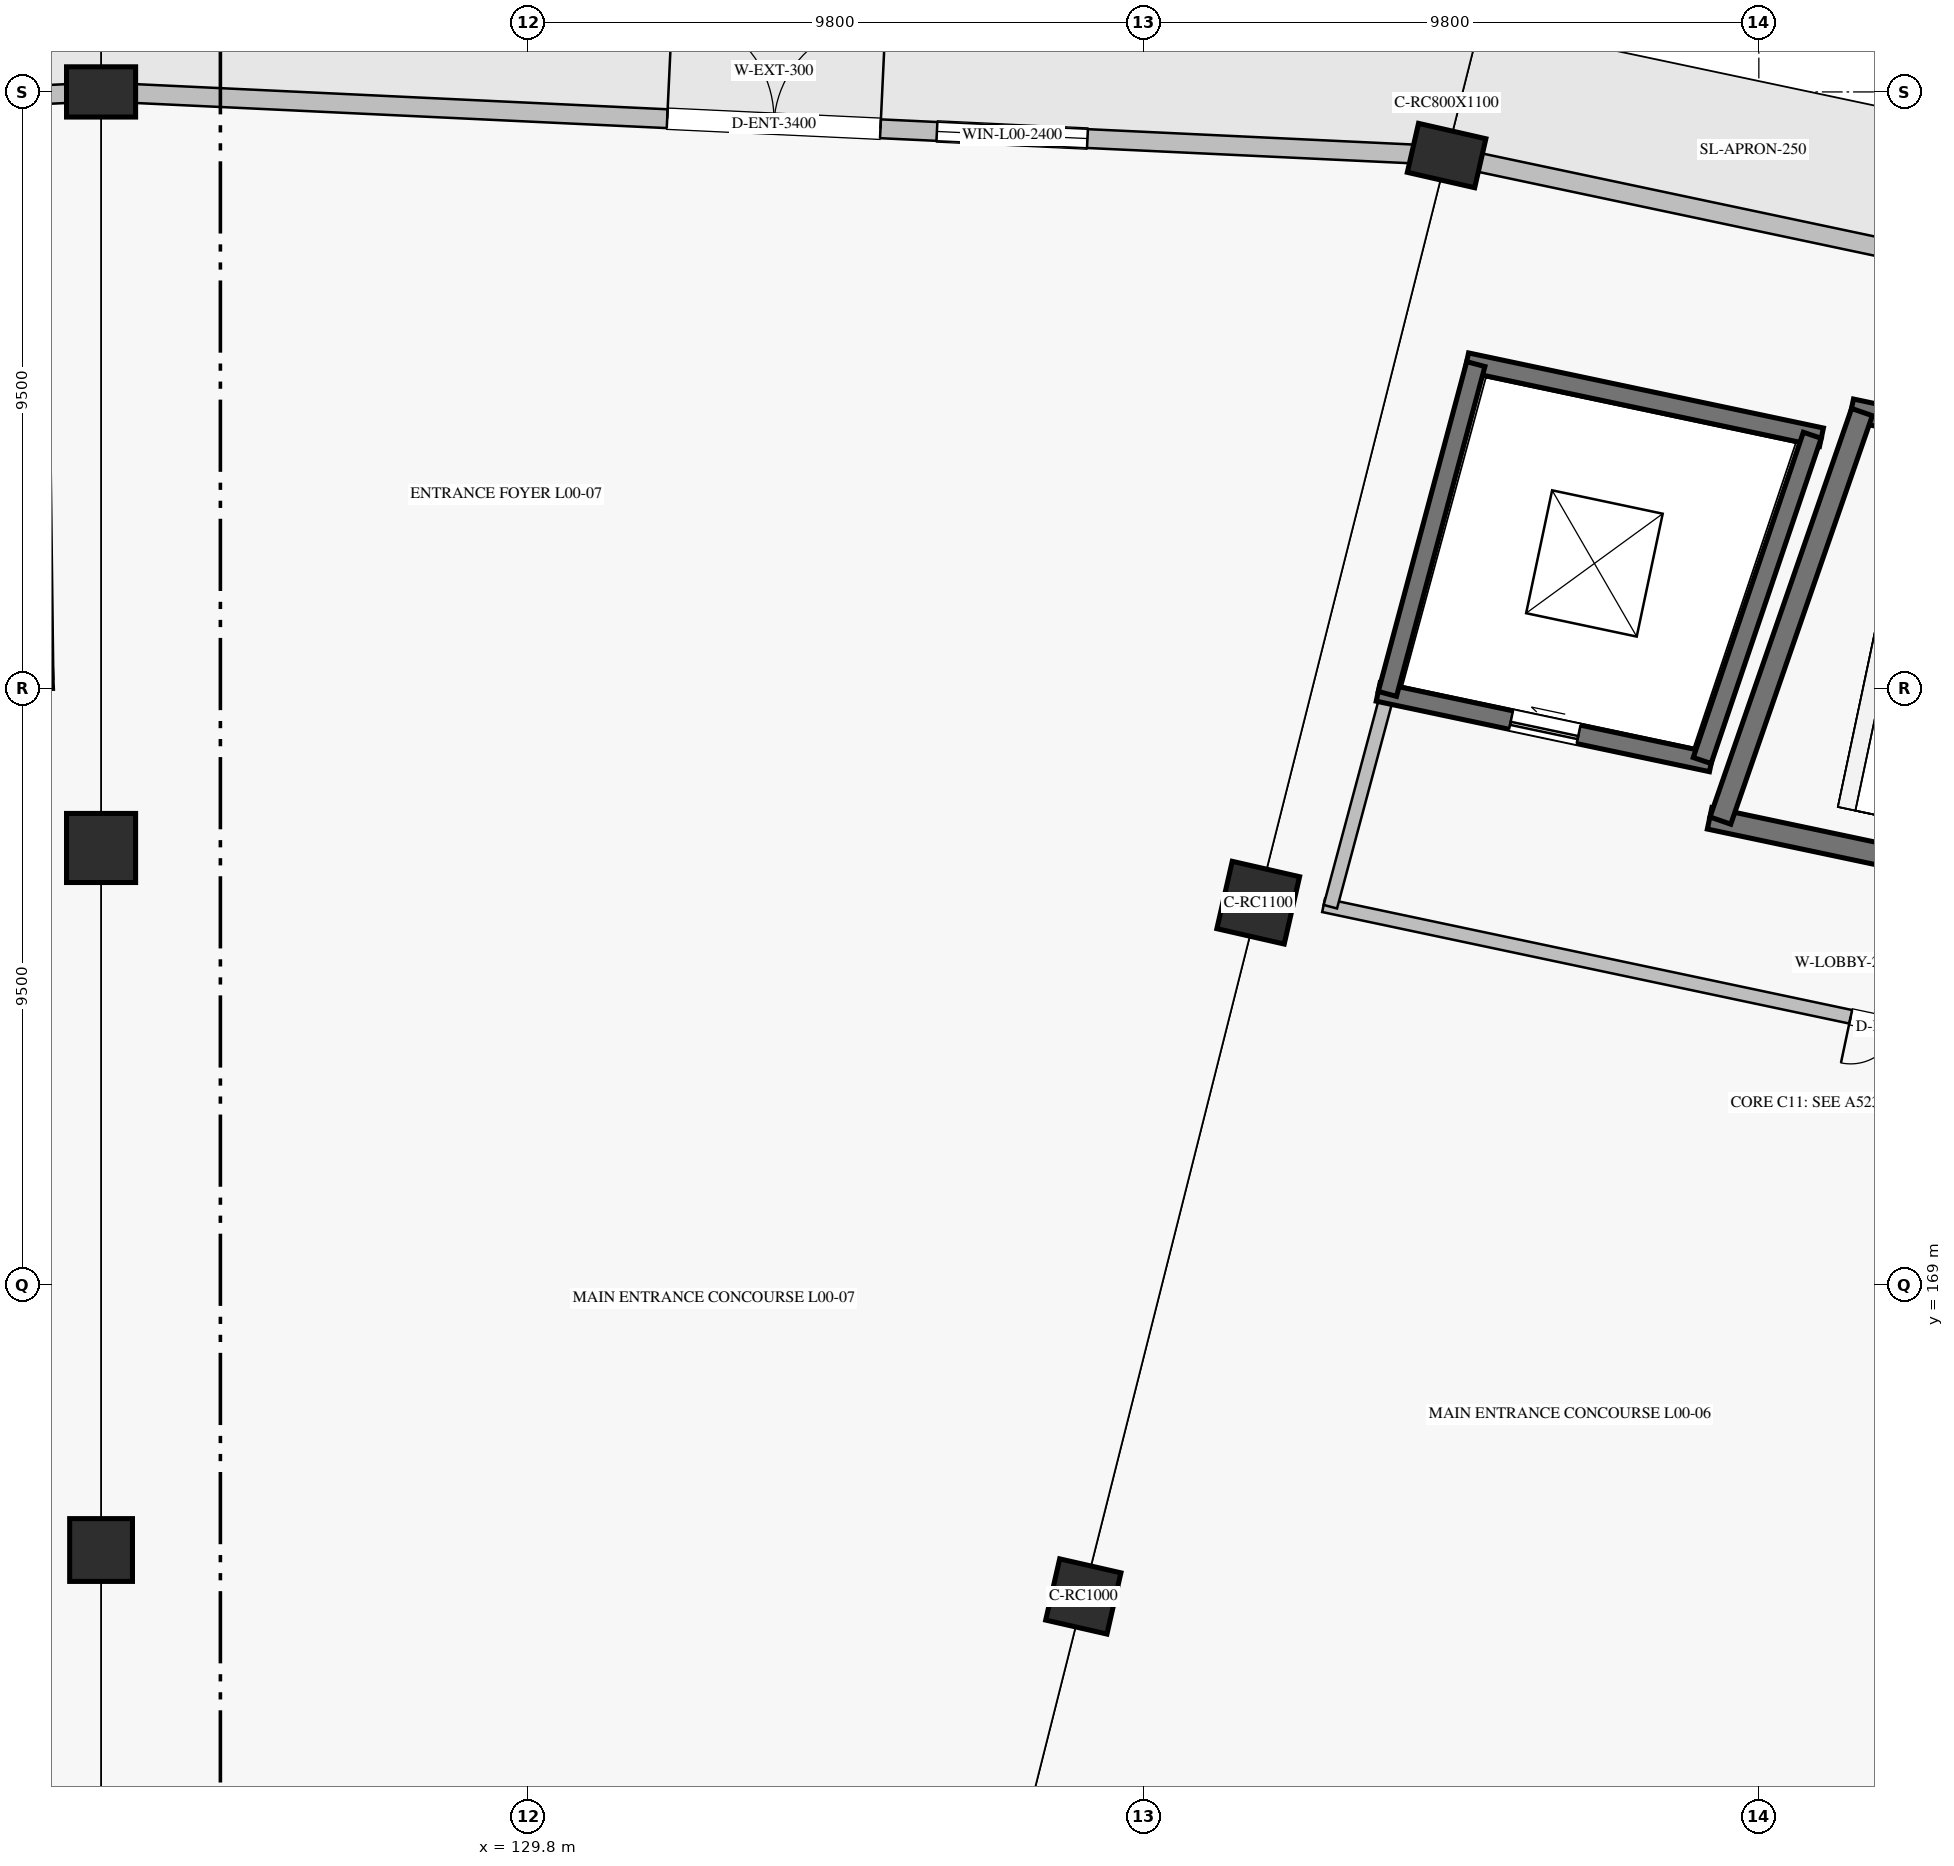
"""IFC4 building model, lengths in metres.
Left out: names, types, materials, properties, quantities, classifications, styles, units other than length and angle.
Written with IfcOpenShell. Run it as: python <this file> out.ifc"""

import sys

from ifc_helpers import new_model, si_unit, direction, frame, frame_2d, origin, origin_2d, place, context, subcontext, project, spatial, rectangle, extrude, element, fill, save


model = new_model("IFC4")
c1 = context("Model", 3, precision=1e-05, world=origin(), true_north=direction((0.0, 1.0)))
c2 = subcontext(c1, "Body", "Model", "MODEL_VIEW")
j1 = project(units=[si_unit("LENGTHUNIT", "METRE"), si_unit("PLANEANGLEUNIT", "RADIAN")], contexts=[c1])
p1 = place(None, origin())
s1 = spatial("IfcSite", under=j1, at=p1, CompositionType="ELEMENT")
p2 = place(p1, origin())
s2 = spatial("IfcBuilding", under=s1, at=p2, CompositionType="ELEMENT")
p3 = place(p2, origin())
s3 = spatial("IfcBuildingStorey", under=s2, at=p3, CompositionType="ELEMENT", Elevation=0.0)
for number, where, z_axis, x_axis in (
    (1, (138.642, 164.04, 0.0), (0.0, 0.0, 1.0), (0.223, 0.975, 0.0)),
    (2, (123.0, 164.78, 0.0), (0.0, 0.0, 1.0), (0.0, 1.0, 0.0)),
):
    element("IfcColumn", number, at=place(p3, frame(where, z_axis=z_axis, x_axis=x_axis)), inside=s3, PredefinedType="COLUMN", context=c2, shape_type="SweptSolid", body=[
        extrude(rectangle(XDim=1.0, YDim=1.0, at=origin_2d()), origin(), (0.0, 0.0, 1.0), 5.78),
    ])
for number, where, z_axis, x_axis in (
    (3, (141.428, 175.089, 0.0), (0.0, 0.0, 1.0), (0.223, 0.975, 0.0)),
    (4, (123.0, 175.96, 0.0), (0.0, 0.0, 1.0), (0.0, 1.0, 0.0)),
):
    element("IfcColumn", number, at=place(p3, frame(where, z_axis=z_axis, x_axis=x_axis)), inside=s3, PredefinedType="COLUMN", context=c2, shape_type="SweptSolid", body=[
        extrude(rectangle(XDim=1.1, YDim=1.1, at=origin_2d()), origin(), (0.0, 0.0, 1.0), 5.78),
    ])
for number, where, z_axis, x_axis in (
    (5, (144.428, 186.987, 0.0), (0.0, 0.0, 1.0), (0.223, 0.975, 0.0)),
    (6, (123.0, 188.0, 0.0), (0.0, 0.0, 1.0), (0.0, 1.0, 0.0)),
):
    element("IfcColumn", number, at=place(p3, frame(where, z_axis=z_axis, x_axis=x_axis)), inside=s3, PredefinedType="COLUMN", context=c2, shape_type="SweptSolid", body=[
        extrude(rectangle(XDim=0.8, YDim=1.1, at=origin_2d()), origin(), (0.0, 0.0, 1.0), 5.78),
    ])
p4 = place(p3, frame((165.423, 182.545, 0.0), z_axis=(0.0, 0.0, 1.0), x_axis=(-0.978345100851, 0.206980346028, 0.0)))
e7 = element("IfcWall", 7, at=p4, inside=s3, PredefinedType="SOLIDWALL", context=c2, shape_type="SweptSolid", body=[
    extrude(rectangle(XDim=21.07, YDim=0.3, at=frame_2d((10.535, 0.0))), origin(), (0.0, 0.0, 1.0), 4.8),
])
p5 = place(p4, frame((1.05, 0.0, 0.0)))
e8 = element("IfcOpeningElement", 8, at=p5, cuts=e7, PredefinedType="OPENING", context=c2, shape_type="SweptSolid", body=[
    extrude(rectangle(XDim=2.0, YDim=2.3, at=frame_2d((1.0, 1.15))), frame((0.0, 0.16, 0.0), z_axis=(0.0, -1.0, 0.0), x_axis=(1.0, 0.0, 0.0)), (0.0, 0.0, 1.0), 0.32),
])
p6 = place(p3, frame((144.038, 187.005, 0.0), z_axis=(0.0, 0.0, 1.0), x_axis=(-0.998884033728, 0.047230150999, 0.0)))
e9 = element("IfcWall", 9, at=p6, inside=s3, PredefinedType="SOLIDWALL", context=c2, shape_type="SweptSolid", body=[
    extrude(rectangle(XDim=20.671, YDim=0.3, at=frame_2d((10.336, 0.0))), origin(), (0.0, 0.0, 1.0), 4.8),
])
p7 = place(p6, frame((8.636, 0.0, 0.0)))
e10 = element("IfcOpeningElement", 10, at=p7, cuts=e9, PredefinedType="OPENING", context=c2, shape_type="SweptSolid", body=[
    extrude(rectangle(XDim=3.4, YDim=2.6, at=frame_2d((1.7, 1.3))), frame((0.0, 0.16, 0.0), z_axis=(0.0, -1.0, 0.0), x_axis=(1.0, 0.0, 0.0)), (0.0, 0.0, 1.0), 0.32),
])
p8 = place(p6, frame((5.336, 0.0, 1.1)))
e11 = element("IfcOpeningElement", 11, at=p8, cuts=e9, PredefinedType="OPENING", context=c2, shape_type="SweptSolid", body=[
    extrude(rectangle(XDim=2.4, YDim=1.8, at=frame_2d((1.2, 0.9))), frame((0.0, 0.16, 0.0), z_axis=(0.0, -1.0, 0.0), x_axis=(1.0, 0.0, 0.0)), (0.0, 0.0, 1.0), 0.32),
])
p9 = place(p3, frame((122.61, 187.982, 0.0), z_axis=(0.0, 0.0, 1.0), x_axis=(-0.998884033728, -0.047230150999, 0.0)))
e12 = element("IfcWall", 12, at=p9, inside=s3, PredefinedType="SOLIDWALL", context=c2, shape_type="SweptSolid", body=[
    extrude(rectangle(XDim=20.671, YDim=0.3, at=frame_2d((10.336, 0.0))), origin(), (0.0, 0.0, 1.0), 4.8),
])
p10 = place(p9, frame((1.05, 0.0, 0.0)))
e13 = element("IfcOpeningElement", 13, at=p10, cuts=e12, PredefinedType="OPENING", context=c2, shape_type="SweptSolid", body=[
    extrude(rectangle(XDim=2.0, YDim=2.3, at=frame_2d((1.0, 1.15))), frame((0.0, 0.16, 0.0), z_axis=(0.0, -1.0, 0.0), x_axis=(1.0, 0.0, 0.0)), (0.0, 0.0, 1.0), 0.32),
])
p11 = place(p3, frame((160.4, 173.94, 0.0), z_axis=(0.0, 0.0, 1.0), x_axis=(-0.978345203961, 0.206979858648, 0.0)))
e14 = element("IfcWall", 14, at=p11, inside=s3, PredefinedType="SHEAR", context=c2, shape_type="SweptSolid", body=[
    extrude(rectangle(XDim=12.044, YDim=0.35, at=frame_2d((6.022, 0.0))), origin(), (0.0, 0.0, 1.0), 5.5),
])
p12 = place(p11, frame((0.475, 0.0, 0.0)))
e15 = element("IfcOpeningElement", 15, at=p12, cuts=e14, PredefinedType="OPENING", context=c2, shape_type="SweptSolid", body=[
    extrude(rectangle(XDim=1.8, YDim=2.2, at=frame_2d((0.9, 1.1))), frame((0.0, 0.185, 0.0), z_axis=(0.0, -1.0, 0.0), x_axis=(1.0, 0.0, 0.0)), (0.0, 0.0, 1.0), 0.37),
])
p13 = place(p3, frame((163.655, 180.233, 0.0), z_axis=(0.0, 0.0, 1.0), x_axis=(-0.978345119536, 0.206980257705, 0.0)))
e16 = element("IfcWall", 16, at=p13, inside=s3, PredefinedType="SHEAR", context=c2, shape_type="SweptSolid", body=[
    extrude(rectangle(XDim=13.067, YDim=0.35, at=frame_2d((6.533, 0.0))), origin(), (0.0, 0.0, 1.0), 5.5),
])
p14 = place(p13, frame((0.582, 0.0, 0.0)))
e17 = element("IfcOpeningElement", 17, at=p14, cuts=e16, PredefinedType="OPENING", context=c2, shape_type="SweptSolid", body=[
    extrude(rectangle(XDim=1.8, YDim=2.2, at=frame_2d((0.9, 1.1))), frame((0.0, 0.185, 0.0), z_axis=(0.0, -1.0, 0.0), x_axis=(1.0, 0.0, 0.0)), (0.0, 0.0, 1.0), 0.37),
])
p15 = place(p3, frame((148.787, 176.396, 0.0), z_axis=(0.0, 0.0, 1.0), x_axis=(0.327491724385, 0.944854047173, 0.0)))
e18 = element("IfcWall", 18, at=p15, inside=s3, PredefinedType="SHEAR", context=c2, shape_type="SweptSolid", body=[
    extrude(rectangle(XDim=6.885, YDim=0.35, at=frame_2d((3.443, 0.0))), origin(), (0.0, 0.0, 1.0), 5.5),
])
p16 = place(p3, frame((148.645, 177.322, 0.0), z_axis=(0.0, 0.0, 1.0), x_axis=(-0.978351630878, 0.206949477793, 0.0)))
e19 = element("IfcWall", 19, at=p16, inside=s3, PredefinedType="SHEAR", context=c2, shape_type="SweptSolid", body=[
    extrude(rectangle(XDim=5.424, YDim=0.3, at=frame_2d((2.712, 0.0))), origin(), (0.0, 0.0, 1.0), 5.5),
])
p17 = place(p16, frame((2.162, 0.0, 0.0)))
e20 = element("IfcOpeningElement", 20, at=p17, cuts=e19, PredefinedType="OPENING", context=c2, shape_type="SweptSolid", body=[
    extrude(rectangle(XDim=1.1, YDim=2.2, at=frame_2d((0.55, 1.1))), frame((0.0, 0.16, 0.0), z_axis=(0.0, -1.0, 0.0), x_axis=(1.0, 0.0, 0.0)), (0.0, 0.0, 1.0), 0.32),
])
p18 = place(p3, frame((150.397, 182.501, 0.0), z_axis=(0.0, 0.0, 1.0), x_axis=(-0.978347069901, 0.206971038591, 0.0)))
e21 = element("IfcWall", 21, at=p18, inside=s3, PredefinedType="SHEAR", context=c2, shape_type="SweptSolid", body=[
    extrude(rectangle(XDim=5.776, YDim=0.3, at=frame_2d((2.888, 0.0))), origin(), (0.0, 0.0, 1.0), 5.5),
])
p19 = place(p3, frame((148.498, 177.353, 0.0), z_axis=(0.0, 0.0, 1.0), x_axis=(0.320537624185, 0.947235784523, 0.0)))
e22 = element("IfcWall", 22, at=p19, inside=s3, PredefinedType="SHEAR", context=c2, shape_type="SweptSolid", body=[
    extrude(rectangle(XDim=5.468, YDim=0.3, at=frame_2d((2.734, 0.0))), origin(), (0.0, 0.0, 1.0), 5.5),
])
p20 = place(p3, frame((143.485, 178.413, 0.0), z_axis=(0.0, 0.0, 1.0), x_axis=(0.258958994481, 0.965888316099, 0.0)))
e23 = element("IfcWall", 23, at=p20, inside=s3, PredefinedType="SHEAR", context=c2, shape_type="SweptSolid", body=[
    extrude(rectangle(XDim=5.438, YDim=0.3, at=frame_2d((2.719, 0.0))), origin(), (0.0, 0.0, 1.0), 5.5),
])
p21 = place(p3, frame((159.084, 171.532, 0.0), z_axis=(0.0, 0.0, 1.0), x_axis=(-0.978342313718, 0.206993519678, 0.0)))
e24 = element("IfcWall", 24, at=p21, inside=s3, PredefinedType="SOLIDWALL", context=c2, shape_type="SweptSolid", body=[
    extrude(rectangle(XDim=16.983, YDim=0.22, at=frame_2d((8.492, 0.0))), origin(), (0.0, 0.0, 1.0), 4.448),
])
p22 = place(p21, frame((6.903, 0.0, 0.0)))
e25 = element("IfcOpeningElement", 25, at=p22, cuts=e24, PredefinedType="OPENING", context=c2, shape_type="SweptSolid", body=[
    extrude(rectangle(XDim=1.5, YDim=2.2, at=frame_2d((0.75, 1.1))), frame((0.0, 0.12, 0.0), z_axis=(0.0, -1.0, 0.0), x_axis=(1.0, 0.0, 0.0)), (0.0, 0.0, 1.0), 0.24),
])
p23 = place(p3, frame((142.576, 175.025, 0.0), z_axis=(0.0, 0.0, 1.0), x_axis=(0.258940146037, 0.965893369255, 0.0)))
e26 = element("IfcWall", 26, at=p23, inside=s3, PredefinedType="SOLIDWALL", context=c2, shape_type="SweptSolid", body=[
    extrude(rectangle(XDim=3.508, YDim=0.22, at=frame_2d((1.754, 0.0))), origin(), (0.0, 0.0, 1.0), 5.5),
])
p24 = place(p3, frame((122.219, 178.675, 0.0), z_axis=(0.0, 0.0, 1.0), x_axis=(-0.998883770468, -0.04723571843, 0.0)))
e27 = element("IfcWall", 27, at=p24, inside=s3, PredefinedType="SHEAR", context=c2, shape_type="SweptSolid", body=[
    extrude(rectangle(XDim=11.831, YDim=0.35, at=frame_2d((5.916, 0.0))), origin(), (0.0, 0.0, 1.0), 5.5),
])
p25 = place(p24, frame((0.475, 0.0, 0.0)))
e28 = element("IfcOpeningElement", 28, at=p25, cuts=e27, PredefinedType="OPENING", context=c2, shape_type="SweptSolid", body=[
    extrude(rectangle(XDim=1.8, YDim=2.2, at=frame_2d((0.9, 1.1))), frame((0.0, 0.185, 0.0), z_axis=(0.0, -1.0, 0.0), x_axis=(1.0, 0.0, 0.0)), (0.0, 0.0, 1.0), 0.37),
])
p26 = place(p7, frame((3.4, 0.0, 0.0), z_axis=(0.0, 0.0, 1.0), x_axis=(-1.0, 0.0, 0.0)))
e29 = element("IfcDoor", 29, at=p26, inside=s3, OperationType="DOUBLE_DOOR_SINGLE_SWING", PredefinedType="DOOR", context=c2, shape_type="SweptSolid", body=[
    extrude(rectangle(XDim=3.4, YDim=2.6, at=frame_2d((1.7, 1.3))), frame((0.0, 0.025, 0.0), z_axis=(0.0, -1.0, 0.0), x_axis=(1.0, 0.0, 0.0)), (0.0, 0.0, 1.0), 0.05),
])
fill(e10, e29)
p27 = place(p8, origin())
e30 = element("IfcWindow", 30, at=p27, inside=s3, PartitioningType="SINGLE_PANEL", PredefinedType="WINDOW", context=c2, shape_type="SweptSolid", body=[
    extrude(rectangle(XDim=2.4, YDim=1.8, at=frame_2d((1.2, 0.9))), frame((0.0, 0.03, 0.0), z_axis=(0.0, -1.0, 0.0), x_axis=(1.0, 0.0, 0.0)), (0.0, 0.0, 1.0), 0.06),
])
fill(e11, e30)
p28 = place(p17, origin())
e31 = element("IfcDoor", 31, at=p28, inside=s3, OperationType="SLIDING_TO_RIGHT", PredefinedType="DOOR", context=c2, shape_type="SweptSolid", body=[
    extrude(rectangle(XDim=1.1, YDim=2.2, at=frame_2d((0.55, 1.1))), frame((0.0, 0.025, 0.0), z_axis=(0.0, -1.0, 0.0), x_axis=(1.0, 0.0, 0.0)), (0.0, 0.0, 1.0), 0.05),
])
fill(e20, e31)
p29 = place(p22, origin())
e32 = element("IfcDoor", 32, at=p29, inside=s3, OperationType="DOUBLE_DOOR_SINGLE_SWING", PredefinedType="DOOR", context=c2, shape_type="SweptSolid", body=[
    extrude(rectangle(XDim=1.5, YDim=2.2, at=frame_2d((0.75, 1.1))), frame((0.0, 0.025, 0.0), z_axis=(0.0, -1.0, 0.0), x_axis=(1.0, 0.0, 0.0)), (0.0, 0.0, 1.0), 0.05),
])
fill(e25, e32)
save(model, sys.argv[1])
